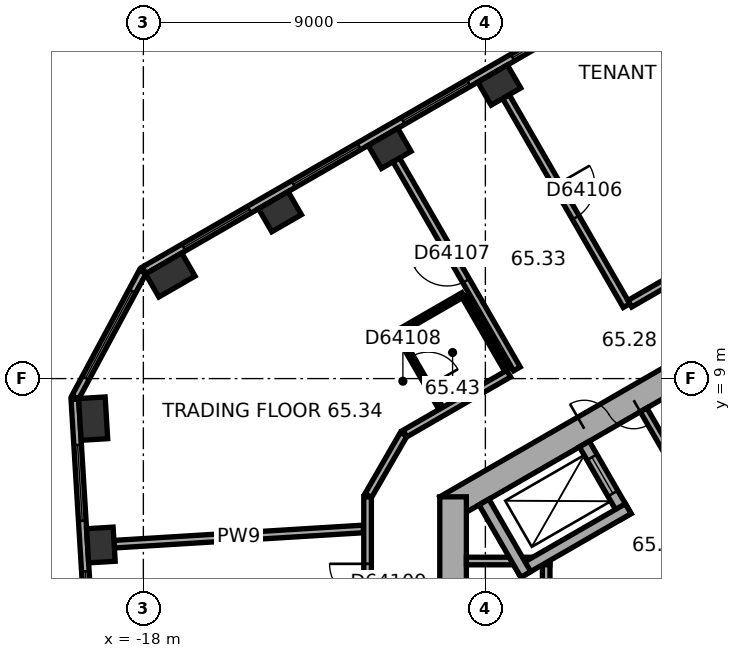
"""IFC4 building model, lengths in metres.
Left out: names, types, materials, properties, quantities, classifications, styles, units other than length and angle.
Written with IfcOpenShell. Run it as: python <this file> out.ifc"""

import sys

from ifc_helpers import new_model, si_unit, direction, frame, frame_2d, origin, origin_2d, place, context, subcontext, project, spatial, rectangle, extrude, element, fill, save


model = new_model("IFC4")
c1 = context("Model", 3, precision=1e-05, world=origin(), true_north=direction((0.0, 1.0)))
c2 = subcontext(c1, "Body", "Model", "MODEL_VIEW")
j1 = project(units=[si_unit("LENGTHUNIT", "METRE"), si_unit("PLANEANGLEUNIT", "RADIAN")], contexts=[c1])
p1 = place(None, origin())
s1 = spatial("IfcSite", under=j1, at=p1, CompositionType="ELEMENT")
p2 = place(p1, origin())
s2 = spatial("IfcBuilding", under=s1, at=p2, CompositionType="ELEMENT")
p3 = place(p2, frame((0.0, 0.0, 263.5)))
s3 = spatial("IfcBuildingStorey", under=s2, at=p3, CompositionType="ELEMENT", Elevation=263.5)
for number, where, z_axis, x_axis in (
    (1, (-8.635, 16.723, 0.0), (0.0, 0.0, 1.0), (-0.866, -0.5, 0.0)),
    (2, (-11.52, 15.057, 0.0), (0.0, 0.0, 1.0), (-0.866, -0.5, 0.0)),
    (3, (-14.406, 13.391, 0.0), (0.0, 0.0, 1.0), (-0.866, -0.5, 0.0)),
):
    element("IfcColumn", number, at=place(p3, frame(where, z_axis=z_axis, x_axis=x_axis)), inside=s3, PredefinedType="COLUMN", context=c2, shape_type="SweptSolid", body=[
        extrude(rectangle(XDim=0.9, YDim=0.7, at=origin_2d()), origin(), (0.0, 0.0, 1.0), 3.7),
    ])
for number, where, z_axis, x_axis in (
    (4, (-17.291, 11.726, 0.0), (0.0, 0.0, 1.0), (-0.866, -0.5, 0.0)),
    (5, (-19.321, 7.947, 0.0), (0.0, 0.0, 1.0), (0.061, -0.998, 0.0)),
):
    element("IfcColumn", number, at=place(p3, frame(where, z_axis=z_axis, x_axis=x_axis)), inside=s3, PredefinedType="COLUMN", context=c2, shape_type="SweptSolid", body=[
        extrude(rectangle(XDim=1.1, YDim=0.7, at=origin_2d()), origin(), (0.0, 0.0, 1.0), 3.7),
    ])
p4 = place(p3, frame((-19.118, 4.621, 0.0), z_axis=(0.0, 0.0, 1.0), x_axis=(0.061048539535, -0.998134798422, 0.0)))
e6 = element("IfcColumn", 6, at=p4, inside=s3, PredefinedType="COLUMN", context=c2, shape_type="SweptSolid", body=[
    extrude(rectangle(XDim=0.9, YDim=0.7, at=origin_2d()), origin(), (0.0, 0.0, 1.0), 3.7),
])
p5 = place(p3, frame((0.175, 11.475, 0.0), z_axis=(0.0, 0.0, 1.0), x_axis=(-0.866026453023, -0.499998182661, 0.0)))
e7 = element("IfcWall", 7, at=p5, inside=s3, PredefinedType="SHEAR", context=c2, shape_type="SweptSolid", body=[
    extrude(rectangle(XDim=11.778, YDim=0.7, at=frame_2d((5.889, 0.0))), origin(), (0.0, 0.0, 1.0), 3.7),
])
p6 = place(p5, frame((6.089, 0.0, 0.0)))
e8 = element("IfcOpeningElement", 8, at=p6, cuts=e7, PredefinedType="OPENING", context=c2, shape_type="SweptSolid", body=[
    extrude(rectangle(XDim=1.5, YDim=2.1, at=frame_2d((0.75, 1.05))), frame((0.0, 0.36, 0.0), z_axis=(0.0, -1.0, 0.0), x_axis=(1.0, 0.0, 0.0)), (0.0, 0.0, 1.0), 0.72),
])
p7 = place(p5, frame((2.939, 0.0, 0.0)))
e9 = element("IfcOpeningElement", 9, at=p7, cuts=e7, PredefinedType="OPENING", context=c2, shape_type="SweptSolid", body=[
    extrude(rectangle(XDim=0.9, YDim=2.1, at=frame_2d((0.45, 1.05))), frame((0.0, 0.36, 0.0), z_axis=(0.0, -1.0, 0.0), x_axis=(1.0, 0.0, 0.0)), (0.0, 0.0, 1.0), 0.72),
])
p8 = place(p3, frame((-9.85, 5.889, 0.0), z_axis=(0.0, 0.0, 1.0), x_axis=(0.0, -1.0, 0.0)))
e10 = element("IfcWall", 10, at=p8, inside=s3, PredefinedType="SHEAR", context=c2, shape_type="SweptSolid", body=[
    extrude(rectangle(XDim=11.778, YDim=0.7, at=frame_2d((5.889, 0.0))), origin(), (0.0, 0.0, 1.0), 3.7),
])
p9 = place(p8, frame((5.039, 0.0, 0.0)))
e11 = element("IfcOpeningElement", 11, at=p9, cuts=e10, PredefinedType="OPENING", context=c2, shape_type="SweptSolid", body=[
    extrude(rectangle(XDim=1.1, YDim=2.1, at=frame_2d((0.55, 1.05))), frame((0.0, 0.36, 0.0), z_axis=(0.0, -1.0, 0.0), x_axis=(1.0, 0.0, 0.0)), (0.0, 0.0, 1.0), 0.72),
])
p10 = place(p8, frame((7.639, 0.0, 0.0)))
e12 = element("IfcOpeningElement", 12, at=p10, cuts=e10, PredefinedType="OPENING", context=c2, shape_type="SweptSolid", body=[
    extrude(rectangle(XDim=1.1, YDim=2.1, at=frame_2d((0.55, 1.05))), frame((0.0, 0.36, 0.0), z_axis=(0.0, -1.0, 0.0), x_axis=(1.0, 0.0, 0.0)), (0.0, 0.0, 1.0), 0.72),
])
p11 = place(p3, frame((-2.624, 20.713, 0.0), z_axis=(0.0, 0.0, 1.0), x_axis=(-0.866026460444, -0.499998169808, 0.0)))
e13 = element("IfcWall", 13, at=p11, inside=s3, PredefinedType="STANDARD", context=c2, shape_type="SweptSolid", body=[
    extrude(rectangle(XDim=17.731, YDim=0.2, at=frame_2d((8.866, 0.0))), origin(), (0.0, 0.0, 1.0), 3.7),
])
p12 = place(p11, frame((1.203, 0.0, 0.9)))
e14 = element("IfcOpeningElement", 14, at=p12, cuts=e13, PredefinedType="OPENING", context=c2, shape_type="SweptSolid", body=[
    extrude(rectangle(XDim=2.0, YDim=2.0, at=frame_2d((1.0, 1.0))), frame((0.0, 0.11, 0.0), z_axis=(0.0, -1.0, 0.0), x_axis=(1.0, 0.0, 0.0)), (0.0, 0.0, 1.0), 0.22),
])
p13 = place(p11, frame((4.535, 0.0, 0.9)))
e15 = element("IfcOpeningElement", 15, at=p13, cuts=e13, PredefinedType="OPENING", context=c2, shape_type="SweptSolid", body=[
    extrude(rectangle(XDim=2.0, YDim=2.0, at=frame_2d((1.0, 1.0))), frame((0.0, 0.11, 0.0), z_axis=(0.0, -1.0, 0.0), x_axis=(1.0, 0.0, 0.0)), (0.0, 0.0, 1.0), 0.22),
])
p14 = place(p11, frame((7.867, 0.0, 0.9)))
e16 = element("IfcOpeningElement", 16, at=p14, cuts=e13, PredefinedType="OPENING", context=c2, shape_type="SweptSolid", body=[
    extrude(rectangle(XDim=2.0, YDim=2.0, at=frame_2d((1.0, 1.0))), frame((0.0, 0.11, 0.0), z_axis=(0.0, -1.0, 0.0), x_axis=(1.0, 0.0, 0.0)), (0.0, 0.0, 1.0), 0.22),
])
p15 = place(p11, frame((11.198, 0.0, 0.9)))
e17 = element("IfcOpeningElement", 17, at=p15, cuts=e13, PredefinedType="OPENING", context=c2, shape_type="SweptSolid", body=[
    extrude(rectangle(XDim=2.0, YDim=2.0, at=frame_2d((1.0, 1.0))), frame((0.0, 0.11, 0.0), z_axis=(0.0, -1.0, 0.0), x_axis=(1.0, 0.0, 0.0)), (0.0, 0.0, 1.0), 0.22),
])
p16 = place(p11, frame((14.53, 0.0, 0.9)))
e18 = element("IfcOpeningElement", 18, at=p16, cuts=e13, PredefinedType="OPENING", context=c2, shape_type="SweptSolid", body=[
    extrude(rectangle(XDim=2.0, YDim=2.0, at=frame_2d((1.0, 1.0))), frame((0.0, 0.11, 0.0), z_axis=(0.0, -1.0, 0.0), x_axis=(1.0, 0.0, 0.0)), (0.0, 0.0, 1.0), 0.22),
])
p17 = place(p3, frame((-18.018, 11.808, 0.0), z_axis=(0.0, 0.0, 1.0), x_axis=(-0.473318619185, -0.880891301315, 0.0)))
e19 = element("IfcWall", 19, at=p17, inside=s3, PredefinedType="STANDARD", context=c2, shape_type="SweptSolid", body=[
    extrude(rectangle(XDim=3.747, YDim=0.2, at=frame_2d((1.874, 0.0))), origin(), (0.0, 0.0, 1.0), 3.7),
])
p18 = place(p17, frame((0.573, 0.0, 0.9)))
e20 = element("IfcOpeningElement", 20, at=p18, cuts=e19, PredefinedType="OPENING", context=c2, shape_type="SweptSolid", body=[
    extrude(rectangle(XDim=2.6, YDim=2.0, at=frame_2d((1.3, 1.0))), frame((0.0, 0.11, 0.0), z_axis=(0.0, -1.0, 0.0), x_axis=(1.0, 0.0, 0.0)), (0.0, 0.0, 1.0), 0.22),
])
p19 = place(p3, frame((-19.803, 8.454, 0.0), z_axis=(0.0, 0.0, 1.0), x_axis=(0.061036717565, -0.998135521414, 0.0)))
e21 = element("IfcWall", 21, at=p19, inside=s3, PredefinedType="STANDARD", context=c2, shape_type="SweptSolid", body=[
    extrude(rectangle(XDim=17.731, YDim=0.2, at=frame_2d((8.866, 0.0))), origin(), (0.0, 0.0, 1.0), 3.7),
])
p20 = place(p19, frame((1.202, 0.0, 0.9)))
e22 = element("IfcOpeningElement", 22, at=p20, cuts=e21, PredefinedType="OPENING", context=c2, shape_type="SweptSolid", body=[
    extrude(rectangle(XDim=2.0, YDim=2.0, at=frame_2d((1.0, 1.0))), frame((0.0, 0.11, 0.0), z_axis=(0.0, -1.0, 0.0), x_axis=(1.0, 0.0, 0.0)), (0.0, 0.0, 1.0), 0.22),
])
p21 = place(p19, frame((4.533, 0.0, 0.9)))
e23 = element("IfcOpeningElement", 23, at=p21, cuts=e21, PredefinedType="OPENING", context=c2, shape_type="SweptSolid", body=[
    extrude(rectangle(XDim=2.0, YDim=2.0, at=frame_2d((1.0, 1.0))), frame((0.0, 0.11, 0.0), z_axis=(0.0, -1.0, 0.0), x_axis=(1.0, 0.0, 0.0)), (0.0, 0.0, 1.0), 0.22),
])
p22 = place(p19, frame((7.865, 0.0, 0.9)))
e24 = element("IfcOpeningElement", 24, at=p22, cuts=e21, PredefinedType="OPENING", context=c2, shape_type="SweptSolid", body=[
    extrude(rectangle(XDim=2.0, YDim=2.0, at=frame_2d((1.0, 1.0))), frame((0.0, 0.11, 0.0), z_axis=(0.0, -1.0, 0.0), x_axis=(1.0, 0.0, 0.0)), (0.0, 0.0, 1.0), 0.22),
])
p23 = place(p19, frame((11.197, 0.0, 0.9)))
e25 = element("IfcOpeningElement", 25, at=p23, cuts=e21, PredefinedType="OPENING", context=c2, shape_type="SweptSolid", body=[
    extrude(rectangle(XDim=2.0, YDim=2.0, at=frame_2d((1.0, 1.0))), frame((0.0, 0.11, 0.0), z_axis=(0.0, -1.0, 0.0), x_axis=(1.0, 0.0, 0.0)), (0.0, 0.0, 1.0), 0.22),
])
p24 = place(p19, frame((14.528, 0.0, 0.9)))
e26 = element("IfcOpeningElement", 26, at=p24, cuts=e21, PredefinedType="OPENING", context=c2, shape_type="SweptSolid", body=[
    extrude(rectangle(XDim=2.0, YDim=2.0, at=frame_2d((1.0, 1.0))), frame((0.0, 0.11, 0.0), z_axis=(0.0, -1.0, 0.0), x_axis=(1.0, 0.0, 0.0)), (0.0, 0.0, 1.0), 0.22),
])
p25 = place(p3, frame((-3.737, 6.272, 0.0), z_axis=(0.0, 0.0, 1.0), x_axis=(-0.50002983664, 0.866008176907, 0.0)))
e27 = element("IfcWall", 27, at=p25, inside=s3, PredefinedType="PARTITIONING", context=c2, shape_type="SweptSolid", body=[
    extrude(rectangle(XDim=2.2, YDim=0.2, at=frame_2d((1.1, 0.0))), origin(), (0.0, 0.0, 1.0), 3.42),
])
p26 = place(p3, frame((-7.4, 4.3, 0.0), z_axis=(0.0, 0.0, 1.0), x_axis=(0.0, -1.0, 0.0)))
e28 = element("IfcWall", 28, at=p26, inside=s3, PredefinedType="PARTITIONING", context=c2, shape_type="SweptSolid", body=[
    extrude(rectangle(XDim=8.0, YDim=0.2, at=frame_2d((4.0, 0.0))), origin(), (0.0, 0.0, 1.0), 3.42),
])
p27 = place(p3, frame((-7.3, 4.2, 0.0), z_axis=(0.0, 0.0, 1.0), x_axis=(-1.0, 0.0, 0.0)))
e29 = element("IfcWall", 29, at=p27, inside=s3, PredefinedType="PARTITIONING", context=c2, shape_type="SweptSolid", body=[
    extrude(rectangle(XDim=2.2, YDim=0.2, at=frame_2d((1.1, 0.0))), origin(), (0.0, 0.0, 1.0), 3.42),
])
p28 = place(p3, frame((-5.295, 5.372, 0.0), z_axis=(0.0, 0.0, 1.0), x_axis=(-0.500077893725, 0.86598042715, 0.0)))
e30 = element("IfcWall", 30, at=p28, inside=s3, PredefinedType="SHEAR", context=c2, shape_type="SweptSolid", body=[
    extrude(rectangle(XDim=2.2, YDim=0.3, at=frame_2d((1.1, 0.0))), origin(), (0.0, 0.0, 1.0), 3.42),
])
p29 = place(p28, frame((0.7, 0.0, 0.0)))
e31 = element("IfcOpeningElement", 31, at=p29, cuts=e30, PredefinedType="OPENING", context=c2, shape_type="SweptSolid", body=[
    extrude(rectangle(XDim=1.1, YDim=2.1, at=frame_2d((0.55, 1.05))), frame((0.0, 0.16, 0.0), z_axis=(0.0, -1.0, 0.0), x_axis=(1.0, 0.0, 0.0)), (0.0, 0.0, 1.0), 0.32),
])
p30 = place(p3, frame((-5.24, 5.577, 0.0), z_axis=(0.0, 0.0, 1.0), x_axis=(-0.866014461049, -0.500018952895, 0.0)))
e32 = element("IfcWall", 32, at=p30, inside=s3, PredefinedType="SHEAR", context=c2, shape_type="SweptSolid", body=[
    extrude(rectangle(XDim=3.35, YDim=0.3, at=frame_2d((1.675, 0.0))), origin(), (0.0, 0.0, 1.0), 3.42),
])
p31 = place(p3, frame((-7.937, 3.847, 0.0), z_axis=(0.0, 0.0, 1.0), x_axis=(-0.50002983664, 0.866008176907, 0.0)))
e33 = element("IfcWall", 33, at=p31, inside=s3, PredefinedType="SHEAR", context=c2, shape_type="SweptSolid", body=[
    extrude(rectangle(XDim=2.2, YDim=0.3, at=frame_2d((1.1, 0.0))), origin(), (0.0, 0.0, 1.0), 3.42),
])
p32 = place(p3, frame((-18.768, 4.643, 0.0), z_axis=(0.0, 0.0, 1.0), x_axis=(0.99813496285, 0.0610458511, 0.0)))
e34 = element("IfcWall", 34, at=p32, inside=s3, PredefinedType="PARTITIONING", context=c2, shape_type="SweptSolid", body=[
    extrude(rectangle(XDim=6.571, YDim=0.2, at=frame_2d((3.285, 0.0))), origin(), (0.0, 0.0, 1.0), 3.42),
])
p33 = place(p3, frame((-12.1, 5.889, 0.0), z_axis=(0.0, 0.0, 1.0), x_axis=(0.0, -1.0, 0.0)))
e35 = element("IfcWall", 35, at=p33, inside=s3, PredefinedType="PARTITIONING", context=c2, shape_type="SweptSolid", body=[
    extrude(rectangle(XDim=3.688, YDim=0.2, at=frame_2d((1.844, 0.0))), origin(), (0.0, 0.0, 1.0), 3.42),
])
p34 = place(p33, frame((1.763, 0.0, 0.0)))
e36 = element("IfcOpeningElement", 36, at=p34, cuts=e35, PredefinedType="OPENING", context=c2, shape_type="SweptSolid", body=[
    extrude(rectangle(XDim=1.0, YDim=2.1, at=frame_2d((0.5, 1.05))), frame((0.0, 0.11, 0.0), z_axis=(0.0, -1.0, 0.0), x_axis=(1.0, 0.0, 0.0)), (0.0, 0.0, 1.0), 0.22),
])
p35 = place(p3, frame((-11.345, 14.754, 0.0), z_axis=(0.0, 0.0, 1.0), x_axis=(0.500005339912, -0.866022320763, 0.0)))
e37 = element("IfcWall", 37, at=p35, inside=s3, PredefinedType="PARTITIONING", context=c2, shape_type="SweptSolid", body=[
    extrude(rectangle(XDim=6.35, YDim=0.2, at=frame_2d((3.175, 0.0))), origin(), (0.0, 0.0, 1.0), 3.42),
])
p36 = place(p35, frame((2.675, 0.0, 0.0)))
e38 = element("IfcOpeningElement", 38, at=p36, cuts=e37, PredefinedType="OPENING", context=c2, shape_type="SweptSolid", body=[
    extrude(rectangle(XDim=1.0, YDim=2.1, at=frame_2d((0.5, 1.05))), frame((0.0, 0.11, 0.0), z_axis=(0.0, -1.0, 0.0), x_axis=(1.0, 0.0, 0.0)), (0.0, 0.0, 1.0), 0.22),
])
p37 = place(p3, frame((-11.319, 10.208, 0.0), z_axis=(0.0, 0.0, 1.0), x_axis=(0.866010750942, 0.50002537861, 0.0)))
e39 = element("IfcWall", 39, at=p37, inside=s3, PredefinedType="PARTITIONING", context=c2, shape_type="SweptSolid", body=[
    extrude(rectangle(XDim=2.0, YDim=0.12, at=frame_2d((1.0, 0.0))), origin(), (0.0, 0.0, 1.0), 3.42),
])
p38 = place(p3, frame((-11.15, 7.534, 0.0), z_axis=(0.0, 0.0, 1.0), x_axis=(-0.500063286585, -0.865988862174, 0.0)))
e40 = element("IfcWall", 40, at=p38, inside=s3, PredefinedType="PARTITIONING", context=c2, shape_type="SweptSolid", body=[
    extrude(rectangle(XDim=1.86, YDim=0.2, at=frame_2d((0.93, 0.0))), origin(), (0.0, 0.0, 1.0), 3.42),
])
p39 = place(p3, frame((-10.169, 8.216, 0.0), z_axis=(0.0, 0.0, 1.0), x_axis=(-0.500030632641, 0.866007717299, 0.0)))
e41 = element("IfcWall", 41, at=p39, inside=s3, PredefinedType="PARTITIONING", context=c2, shape_type="SweptSolid", body=[
    extrude(rectangle(XDim=2.24, YDim=0.12, at=frame_2d((1.12, 0.0))), origin(), (0.0, 0.0, 1.0), 3.42),
])
p40 = place(p39, frame((0.67, 0.0, 0.0)))
e42 = element("IfcOpeningElement", 42, at=p40, cuts=e41, PredefinedType="OPENING", context=c2, shape_type="SweptSolid", body=[
    extrude(rectangle(XDim=0.9, YDim=2.1, at=frame_2d((0.45, 1.05))), frame((0.0, 0.07, 0.0), z_axis=(0.0, -1.0, 0.0), x_axis=(1.0, 0.0, 0.0)), (0.0, 0.0, 1.0), 0.14),
])
p41 = place(p3, frame((-9.557, 11.156, 0.0), z_axis=(0.0, 0.0, 1.0), x_axis=(0.49994888933, -0.866054910533, 0.0)))
e43 = element("IfcWall", 43, at=p41, inside=s3, PredefinedType="PARTITIONING", context=c2, shape_type="SweptSolid", body=[
    extrude(rectangle(XDim=2.24, YDim=0.12, at=frame_2d((1.12, 0.0))), origin(), (0.0, 0.0, 1.0), 3.42),
])
p42 = place(p3, frame((-8.46, 16.42, 0.0), z_axis=(0.0, 0.0, 1.0), x_axis=(0.500005339912, -0.866022320763, 0.0)))
e44 = element("IfcWall", 44, at=p42, inside=s3, PredefinedType="PARTITIONING", context=c2, shape_type="SweptSolid", body=[
    extrude(rectangle(XDim=6.35, YDim=0.2, at=frame_2d((3.175, 0.0))), origin(), (0.0, 0.0, 1.0), 2.87),
])
p43 = place(p42, frame((2.675, 0.0, 0.0)))
e45 = element("IfcOpeningElement", 45, at=p43, cuts=e44, PredefinedType="OPENING", context=c2, shape_type="SweptSolid", body=[
    extrude(rectangle(XDim=1.0, YDim=2.1, at=frame_2d((0.5, 1.05))), frame((0.0, 0.11, 0.0), z_axis=(0.0, -1.0, 0.0), x_axis=(1.0, 0.0, 0.0)), (0.0, 0.0, 1.0), 0.22),
])
p44 = place(p3, frame((-8.387, 9.13, 0.0), z_axis=(0.0, 0.0, 1.0), x_axis=(-0.866026878644, -0.499997445459, 0.0)))
e46 = element("IfcWall", 46, at=p44, inside=s3, PredefinedType="PARTITIONING", context=c2, shape_type="SweptSolid", body=[
    extrude(rectangle(XDim=3.151, YDim=0.2, at=frame_2d((1.575, 0.0))), origin(), (0.0, 0.0, 1.0), 3.42),
])
p45 = place(p3, frame((-0.95, 13.423, 0.0), z_axis=(0.0, 0.0, 1.0), x_axis=(-0.86603557629, -0.499982380289, 0.0)))
e47 = element("IfcWall", 47, at=p45, inside=s3, PredefinedType="PARTITIONING", context=c2, shape_type="SweptSolid", body=[
    extrude(rectangle(XDim=4.906, YDim=0.2, at=frame_2d((2.453, 0.0))), origin(), (0.0, 0.0, 1.0), 3.42),
])
p46 = place(p13, origin())
e48 = element("IfcWindow", 48, at=p46, inside=s3, PartitioningType="SINGLE_PANEL", PredefinedType="WINDOW", context=c2, shape_type="SweptSolid", body=[
    extrude(rectangle(XDim=2.0, YDim=2.0, at=frame_2d((1.0, 1.0))), frame((0.0, 0.03, 0.0), z_axis=(0.0, -1.0, 0.0), x_axis=(1.0, 0.0, 0.0)), (0.0, 0.0, 1.0), 0.06),
])
fill(e15, e48)
p47 = place(p14, origin())
e49 = element("IfcWindow", 49, at=p47, inside=s3, PartitioningType="SINGLE_PANEL", PredefinedType="WINDOW", context=c2, shape_type="SweptSolid", body=[
    extrude(rectangle(XDim=2.0, YDim=2.0, at=frame_2d((1.0, 1.0))), frame((0.0, 0.03, 0.0), z_axis=(0.0, -1.0, 0.0), x_axis=(1.0, 0.0, 0.0)), (0.0, 0.0, 1.0), 0.06),
])
fill(e16, e49)
p48 = place(p15, origin())
e50 = element("IfcWindow", 50, at=p48, inside=s3, PartitioningType="SINGLE_PANEL", PredefinedType="WINDOW", context=c2, shape_type="SweptSolid", body=[
    extrude(rectangle(XDim=2.0, YDim=2.0, at=frame_2d((1.0, 1.0))), frame((0.0, 0.03, 0.0), z_axis=(0.0, -1.0, 0.0), x_axis=(1.0, 0.0, 0.0)), (0.0, 0.0, 1.0), 0.06),
])
fill(e17, e50)
p49 = place(p16, origin())
e51 = element("IfcWindow", 51, at=p49, inside=s3, PartitioningType="SINGLE_PANEL", PredefinedType="WINDOW", context=c2, shape_type="SweptSolid", body=[
    extrude(rectangle(XDim=2.0, YDim=2.0, at=frame_2d((1.0, 1.0))), frame((0.0, 0.03, 0.0), z_axis=(0.0, -1.0, 0.0), x_axis=(1.0, 0.0, 0.0)), (0.0, 0.0, 1.0), 0.06),
])
fill(e18, e51)
p50 = place(p18, origin())
e52 = element("IfcWindow", 52, at=p50, inside=s3, PartitioningType="SINGLE_PANEL", PredefinedType="WINDOW", context=c2, shape_type="SweptSolid", body=[
    extrude(rectangle(XDim=2.6, YDim=2.0, at=frame_2d((1.3, 1.0))), frame((0.0, 0.03, 0.0), z_axis=(0.0, -1.0, 0.0), x_axis=(1.0, 0.0, 0.0)), (0.0, 0.0, 1.0), 0.06),
])
fill(e20, e52)
p51 = place(p20, origin())
e53 = element("IfcWindow", 53, at=p51, inside=s3, PartitioningType="SINGLE_PANEL", PredefinedType="WINDOW", context=c2, shape_type="SweptSolid", body=[
    extrude(rectangle(XDim=2.0, YDim=2.0, at=frame_2d((1.0, 1.0))), frame((0.0, 0.03, 0.0), z_axis=(0.0, -1.0, 0.0), x_axis=(1.0, 0.0, 0.0)), (0.0, 0.0, 1.0), 0.06),
])
fill(e22, e53)
p52 = place(p21, origin())
e54 = element("IfcWindow", 54, at=p52, inside=s3, PartitioningType="SINGLE_PANEL", PredefinedType="WINDOW", context=c2, shape_type="SweptSolid", body=[
    extrude(rectangle(XDim=2.0, YDim=2.0, at=frame_2d((1.0, 1.0))), frame((0.0, 0.03, 0.0), z_axis=(0.0, -1.0, 0.0), x_axis=(1.0, 0.0, 0.0)), (0.0, 0.0, 1.0), 0.06),
])
fill(e23, e54)
p53 = place(p6, origin())
e55 = element("IfcDoor", 55, at=p53, inside=s3, OperationType="DOUBLE_DOOR_SINGLE_SWING", PredefinedType="DOOR", context=c2, shape_type="SweptSolid", body=[
    extrude(rectangle(XDim=1.5, YDim=2.1, at=frame_2d((0.75, 1.05))), frame((0.0, 0.025, 0.0), z_axis=(0.0, -1.0, 0.0), x_axis=(1.0, 0.0, 0.0)), (0.0, 0.0, 1.0), 0.05),
])
fill(e8, e55)
p54 = place(p29, origin())
e56 = element("IfcDoor", 56, at=p54, inside=s3, OperationType="DOUBLE_DOOR_SLIDING", PredefinedType="DOOR", context=c2, shape_type="SweptSolid", body=[
    extrude(rectangle(XDim=1.1, YDim=2.1, at=frame_2d((0.55, 1.05))), frame((0.0, 0.025, 0.0), z_axis=(0.0, -1.0, 0.0), x_axis=(1.0, 0.0, 0.0)), (0.0, 0.0, 1.0), 0.05),
])
fill(e31, e56)
p55 = place(p43, origin())
e57 = element("IfcDoor", 57, at=p55, inside=s3, OperationType="SINGLE_SWING_LEFT", PredefinedType="DOOR", context=c2, shape_type="SweptSolid", body=[
    extrude(rectangle(XDim=1.0, YDim=2.1, at=frame_2d((0.5, 1.05))), frame((0.0, 0.025, 0.0), z_axis=(0.0, -1.0, 0.0), x_axis=(1.0, 0.0, 0.0)), (0.0, 0.0, 1.0), 0.05),
])
fill(e45, e57)
p56 = place(p36, origin())
e58 = element("IfcDoor", 58, at=p56, inside=s3, OperationType="SINGLE_SWING_LEFT", PredefinedType="DOOR", context=c2, shape_type="SweptSolid", body=[
    extrude(rectangle(XDim=1.0, YDim=2.1, at=frame_2d((0.5, 1.05))), frame((0.0, 0.025, 0.0), z_axis=(0.0, -1.0, 0.0), x_axis=(1.0, 0.0, 0.0)), (0.0, 0.0, 1.0), 0.05),
])
fill(e38, e58)
p57 = place(p40, origin())
e59 = element("IfcDoor", 59, at=p57, inside=s3, OperationType="SINGLE_SWING_LEFT", PredefinedType="DOOR", context=c2, shape_type="SweptSolid", body=[
    extrude(rectangle(XDim=0.9, YDim=2.1, at=frame_2d((0.45, 1.05))), frame((0.0, 0.025, 0.0), z_axis=(0.0, -1.0, 0.0), x_axis=(1.0, 0.0, 0.0)), (0.0, 0.0, 1.0), 0.05),
])
fill(e42, e59)
p58 = place(p34, origin())
e60 = element("IfcDoor", 60, at=p58, inside=s3, OperationType="SINGLE_SWING_LEFT", PredefinedType="DOOR", context=c2, shape_type="SweptSolid", body=[
    extrude(rectangle(XDim=1.0, YDim=2.1, at=frame_2d((0.5, 1.05))), frame((0.0, 0.025, 0.0), z_axis=(0.0, -1.0, 0.0), x_axis=(1.0, 0.0, 0.0)), (0.0, 0.0, 1.0), 0.05),
])
fill(e36, e60)
save(model, sys.argv[1])
